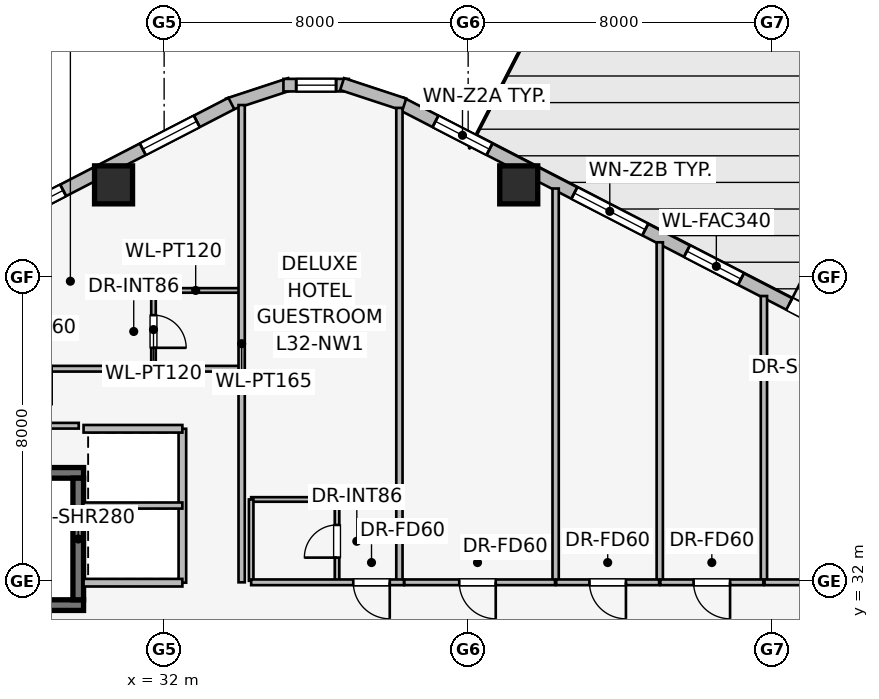
"""IFC4 building model, lengths in metres.
Left out: names, types, materials, properties, quantities, classifications, styles, units other than length and angle.
Written with IfcOpenShell. Run it as: python <this file> out.ifc"""

import sys

from ifc_helpers import new_model, si_unit, direction, frame, frame_2d, origin, origin_2d, place, context, subcontext, project, spatial, rectangle, extrude, element, fill, save


model = new_model("IFC4")
c1 = context("Model", 3, precision=1e-05, world=origin(), true_north=direction((0.0, 1.0)))
c2 = subcontext(c1, "Body", "Model", "MODEL_VIEW")
j1 = project(units=[si_unit("LENGTHUNIT", "METRE"), si_unit("PLANEANGLEUNIT", "RADIAN")], contexts=[c1])
p1 = place(None, origin())
s1 = spatial("IfcSite", under=j1, at=p1, CompositionType="ELEMENT")
p2 = place(p1, origin())
s2 = spatial("IfcBuilding", under=s1, at=p2, CompositionType="ELEMENT")
p3 = place(p2, frame((0.0, 0.0, 122.25)))
s3 = spatial("IfcBuildingStorey", under=s2, at=p3, CompositionType="ELEMENT", Elevation=122.25)
p4 = place(p3, frame((21.52, 31.36, 0.0), z_axis=(0.0, 0.0, 1.0), x_axis=(1.0, 0.0, 0.0)))
e1 = element("IfcWall", 1, at=p4, inside=s3, PredefinedType="SHEAR", context=c2, shape_type="SweptSolid", body=[
    extrude(rectangle(XDim=8.36, YDim=0.28, at=frame_2d((4.18, 0.0))), origin(), (0.0, 0.0, 1.0), 3.45),
])
p5 = place(p4, frame((0.45, 0.0, 0.0)))
e2 = element("IfcOpeningElement", 2, at=p5, cuts=e1, PredefinedType="OPENING", context=c2, shape_type="SweptSolid", body=[
    extrude(rectangle(XDim=1.05, YDim=2.0, at=frame_2d((0.525, 1.0))), frame((0.0, 0.15, 0.0), z_axis=(0.0, -1.0, 0.0), x_axis=(1.0, 0.0, 0.0)), (0.0, 0.0, 1.0), 0.3),
])
p6 = place(p3, frame((29.88, 34.84, 0.0), z_axis=(0.0, 0.0, 1.0), x_axis=(-1.0, 0.0, 0.0)))
e3 = element("IfcWall", 3, at=p6, inside=s3, PredefinedType="SHEAR", context=c2, shape_type="SweptSolid", body=[
    extrude(rectangle(XDim=8.36, YDim=0.28, at=frame_2d((4.18, 0.0))), origin(), (0.0, 0.0, 1.0), 3.45),
])
p7 = place(p3, frame((29.74, 31.5, 0.0), z_axis=(0.0, 0.0, 1.0), x_axis=(0.0, 1.0, 0.0)))
e4 = element("IfcWall", 4, at=p7, inside=s3, PredefinedType="SHEAR", context=c2, shape_type="SweptSolid", body=[
    extrude(rectangle(XDim=3.2, YDim=0.28, at=frame_2d((1.6, 0.0))), origin(), (0.0, 0.0, 1.0), 3.45),
])
for number, where, z_axis, x_axis in (
    (5, (41.331, 42.418, 0.0), (0.0, 0.0, 1.0), (1.0, 0.0, 0.0)),
    (6, (30.669, 42.418, 0.0), (0.0, 0.0, 1.0), (1.0, 0.0, 0.0)),
):
    element("IfcColumn", number, at=place(p3, frame(where, z_axis=z_axis, x_axis=x_axis)), inside=s3, PredefinedType="COLUMN", context=c2, shape_type="SweptSolid", body=[
        extrude(rectangle(XDim=1.0, YDim=1.0, at=origin_2d()), origin(), (0.0, 0.0, 1.0), 3.45),
    ])
p8 = place(p3, frame((38.231, 44.558, 0.0), z_axis=(0.0, 0.0, 1.0), x_axis=(0.888613612362, -0.458656568606, 0.0)))
e7 = element("IfcWall", 7, at=p8, inside=s3, PredefinedType="STANDARD", context=c2, shape_type="SweptSolid", body=[
    extrude(rectangle(XDim=18.681, YDim=0.34, at=frame_2d((9.34, 0.0))), origin(), (0.0, 0.0, 1.0), 3.19),
])
p9 = place(p8, frame((11.5, 0.0, 0.0)))
e8 = element("IfcOpeningElement", 8, at=p9, cuts=e7, PredefinedType="OPENING", context=c2, shape_type="SweptSolid", body=[
    extrude(rectangle(XDim=1.65, YDim=2.25, at=frame_2d((0.825, 1.125))), frame((0.0, 0.18, 0.0), z_axis=(0.0, -1.0, 0.0), x_axis=(1.0, 0.0, 0.0)), (0.0, 0.0, 1.0), 0.36),
])
p10 = place(p8, frame((1.023, 0.0, 0.75)))
e9 = element("IfcOpeningElement", 9, at=p10, cuts=e7, PredefinedType="OPENING", context=c2, shape_type="SweptSolid", body=[
    extrude(rectangle(XDim=1.6, YDim=1.55, at=frame_2d((0.8, 0.775))), frame((0.0, 0.18, 0.0), z_axis=(0.0, -1.0, 0.0), x_axis=(1.0, 0.0, 0.0)), (0.0, 0.0, 1.0), 0.36),
])
p11 = place(p8, frame((5.135, 0.0, 0.75)))
e10 = element("IfcOpeningElement", 10, at=p11, cuts=e7, PredefinedType="OPENING", context=c2, shape_type="SweptSolid", body=[
    extrude(rectangle(XDim=2.1, YDim=1.5, at=frame_2d((1.05, 0.75))), frame((0.0, 0.18, 0.0), z_axis=(0.0, -1.0, 0.0), x_axis=(1.0, 0.0, 0.0)), (0.0, 0.0, 1.0), 0.36),
])
p12 = place(p8, frame((8.469, 0.0, 0.75)))
e11 = element("IfcOpeningElement", 11, at=p12, cuts=e7, PredefinedType="OPENING", context=c2, shape_type="SweptSolid", body=[
    extrude(rectangle(XDim=1.6, YDim=1.55, at=frame_2d((0.8, 0.775))), frame((0.0, 0.18, 0.0), z_axis=(0.0, -1.0, 0.0), x_axis=(1.0, 0.0, 0.0)), (0.0, 0.0, 1.0), 0.36),
])
p13 = place(p8, frame((16.697, 0.0, 0.75)))
e12 = element("IfcOpeningElement", 12, at=p13, cuts=e7, PredefinedType="OPENING", context=c2, shape_type="SweptSolid", body=[
    extrude(rectangle(XDim=1.05, YDim=1.4, at=frame_2d((0.525, 0.7))), frame((0.0, 0.18, 0.0), z_axis=(0.0, -1.0, 0.0), x_axis=(1.0, 0.0, 0.0)), (0.0, 0.0, 1.0), 0.36),
])
p14 = place(p3, frame((33.681, 44.532, 0.0), z_axis=(0.0, 0.0, 1.0), x_axis=(0.949937416267, 0.312440242569, 0.0)))
e13 = element("IfcWall", 13, at=p14, inside=s3, PredefinedType="STANDARD", context=c2, shape_type="SweptSolid", body=[
    extrude(rectangle(XDim=1.722, YDim=0.33, at=frame_2d((0.861, 0.0))), origin(), (0.0, 0.0, 1.0), 3.19),
])
p15 = place(p3, frame((35.139, 45.041, 0.0), z_axis=(0.0, 0.0, 1.0), x_axis=(1.0, 0.0, 0.0)))
e14 = element("IfcWall", 14, at=p15, inside=s3, PredefinedType="STANDARD", context=c2, shape_type="SweptSolid", body=[
    extrude(rectangle(XDim=1.722, YDim=0.33, at=frame_2d((0.861, 0.0))), origin(), (0.0, 0.0, 1.0), 3.19),
])
p16 = place(p15, frame((0.336, 0.0, 0.75)))
e15 = element("IfcOpeningElement", 15, at=p16, cuts=e14, PredefinedType="OPENING", context=c2, shape_type="SweptSolid", body=[
    extrude(rectangle(XDim=1.05, YDim=1.4, at=frame_2d((0.525, 0.7))), frame((0.0, 0.175, 0.0), z_axis=(0.0, -1.0, 0.0), x_axis=(1.0, 0.0, 0.0)), (0.0, 0.0, 1.0), 0.35),
])
p17 = place(p3, frame((36.683, 45.07, 0.0), z_axis=(0.0, 0.0, 1.0), x_axis=(0.949937416267, -0.312440242569, 0.0)))
e16 = element("IfcWall", 16, at=p17, inside=s3, PredefinedType="STANDARD", context=c2, shape_type="SweptSolid", body=[
    extrude(rectangle(XDim=1.722, YDim=0.33, at=frame_2d((0.861, 0.0))), origin(), (0.0, 0.0, 1.0), 3.19),
])
p18 = place(p3, frame((17.169, 35.99, 0.0), z_axis=(0.0, 0.0, 1.0), x_axis=(0.888613612362, 0.458656568606, 0.0)))
e17 = element("IfcWall", 17, at=p18, inside=s3, PredefinedType="STANDARD", context=c2, shape_type="SweptSolid", body=[
    extrude(rectangle(XDim=18.681, YDim=0.34, at=frame_2d((9.34, 0.0))), origin(), (0.0, 0.0, 1.0), 3.19),
])
p19 = place(p18, frame((1.023, 0.0, 0.75)))
e18 = element("IfcOpeningElement", 18, at=p19, cuts=e17, PredefinedType="OPENING", context=c2, shape_type="SweptSolid", body=[
    extrude(rectangle(XDim=1.6, YDim=1.55, at=frame_2d((0.8, 0.775))), frame((0.0, 0.18, 0.0), z_axis=(0.0, -1.0, 0.0), x_axis=(1.0, 0.0, 0.0)), (0.0, 0.0, 1.0), 0.36),
])
p20 = place(p18, frame((4.981, 0.0, 0.75)))
e19 = element("IfcOpeningElement", 19, at=p20, cuts=e17, PredefinedType="OPENING", context=c2, shape_type="SweptSolid", body=[
    extrude(rectangle(XDim=2.1, YDim=1.5, at=frame_2d((1.05, 0.75))), frame((0.0, 0.18, 0.0), z_axis=(0.0, -1.0, 0.0), x_axis=(1.0, 0.0, 0.0)), (0.0, 0.0, 1.0), 0.36),
])
p21 = place(p18, frame((8.29, 0.0, 0.75)))
e20 = element("IfcOpeningElement", 20, at=p21, cuts=e17, PredefinedType="OPENING", context=c2, shape_type="SweptSolid", body=[
    extrude(rectangle(XDim=2.1, YDim=1.5, at=frame_2d((1.05, 0.75))), frame((0.0, 0.18, 0.0), z_axis=(0.0, -1.0, 0.0), x_axis=(1.0, 0.0, 0.0)), (0.0, 0.0, 1.0), 0.36),
])
p22 = place(p18, frame((11.6, 0.0, 0.75)))
e21 = element("IfcOpeningElement", 21, at=p22, cuts=e17, PredefinedType="OPENING", context=c2, shape_type="SweptSolid", body=[
    extrude(rectangle(XDim=2.1, YDim=1.5, at=frame_2d((1.05, 0.75))), frame((0.0, 0.18, 0.0), z_axis=(0.0, -1.0, 0.0), x_axis=(1.0, 0.0, 0.0)), (0.0, 0.0, 1.0), 0.36),
])
p23 = place(p18, frame((16.058, 0.0, 0.75)))
e22 = element("IfcOpeningElement", 22, at=p23, cuts=e17, PredefinedType="OPENING", context=c2, shape_type="SweptSolid", body=[
    extrude(rectangle(XDim=1.6, YDim=1.55, at=frame_2d((0.8, 0.775))), frame((0.0, 0.18, 0.0), z_axis=(0.0, -1.0, 0.0), x_axis=(1.0, 0.0, 0.0)), (0.0, 0.0, 1.0), 0.36),
])
p24 = place(p3, frame((32.48, 31.95, 0.0), z_axis=(0.0, 0.0, 1.0), x_axis=(0.0, 1.0, 0.0)))
e23 = element("IfcWall", 23, at=p24, inside=s3, PredefinedType="PARTITIONING", context=c2, shape_type="SweptSolid", body=[
    extrude(rectangle(XDim=4.05, YDim=0.2, at=frame_2d((2.025, 0.0))), origin(), (0.0, 0.0, 1.0), 3.19),
])
for number, where, z_axis, x_axis in (
    (24, (29.88, 36.0, 0.0), (0.0, 0.0, 1.0), (1.0, 0.0, 0.0)),
    (25, (32.48, 31.95, 0.0), (0.0, 0.0, 1.0), (-1.0, 0.0, 0.0)),
):
    element("IfcWall", number, at=place(p3, frame(where, z_axis=z_axis, x_axis=x_axis)), inside=s3, PredefinedType="PARTITIONING", context=c2, shape_type="SweptSolid", body=[
        extrude(rectangle(XDim=2.6, YDim=0.2, at=frame_2d((1.3, 0.0))), origin(), (0.0, 0.0, 1.0), 3.19),
    ])
p25 = place(p3, frame((29.875, 33.98, 0.0), z_axis=(0.0, 0.0, 1.0), x_axis=(1.0, 0.0, 0.0)))
e26 = element("IfcWall", 26, at=p25, inside=s3, PredefinedType="PARTITIONING", context=c2, shape_type="SweptSolid", body=[
    extrude(rectangle(XDim=2.605, YDim=0.16, at=frame_2d((1.302, 0.0))), origin(), (0.0, 0.0, 1.0), 3.19),
])
p26 = place(p3, frame((34.0, 39.64, 0.0), z_axis=(0.0, 0.0, 1.0), x_axis=(-1.0, 0.0, 0.0)))
e27 = element("IfcWall", 27, at=p26, inside=s3, PredefinedType="PARTITIONING", context=c2, shape_type="SweptSolid", body=[
    extrude(rectangle(XDim=2.34, YDim=0.12, at=frame_2d((1.17, 0.0))), origin(), (0.0, 0.0, 1.0), 3.19),
])
p27 = place(p3, frame((31.72, 39.64, 0.0), z_axis=(0.0, 0.0, 1.0), x_axis=(0.0, -1.0, 0.0)))
e28 = element("IfcWall", 28, at=p27, inside=s3, PredefinedType="PARTITIONING", context=c2, shape_type="SweptSolid", body=[
    extrude(rectangle(XDim=2.06, YDim=0.12, at=frame_2d((1.03, 0.0))), origin(), (0.0, 0.0, 1.0), 3.19),
])
p28 = place(p27, frame((0.65, 0.0, 0.0)))
e29 = element("IfcOpeningElement", 29, at=p28, cuts=e28, PredefinedType="OPENING", context=c2, shape_type="SweptSolid", body=[
    extrude(rectangle(XDim=0.86, YDim=2.0, at=frame_2d((0.43, 1.0))), frame((0.0, 0.07, 0.0), z_axis=(0.0, -1.0, 0.0), x_axis=(1.0, 0.0, 0.0)), (0.0, 0.0, 1.0), 0.14),
])
p29 = place(p3, frame((34.0, 37.58, 0.0), z_axis=(0.0, 0.0, 1.0), x_axis=(-1.0, 0.0, 0.0)))
e30 = element("IfcWall", 30, at=p29, inside=s3, PredefinedType="PARTITIONING", context=c2, shape_type="SweptSolid", body=[
    extrude(rectangle(XDim=13.707, YDim=0.15, at=frame_2d((6.854, 0.0))), origin(), (0.0, 0.0, 1.0), 3.19),
])
p30 = place(p29, frame((4.96, 0.0, 0.0)))
e31 = element("IfcOpeningElement", 31, at=p30, cuts=e30, PredefinedType="OPENING", context=c2, shape_type="SweptSolid", body=[
    extrude(rectangle(XDim=0.96, YDim=2.0, at=frame_2d((0.48, 1.0))), frame((0.0, 0.085, 0.0), z_axis=(0.0, -1.0, 0.0), x_axis=(1.0, 0.0, 0.0)), (0.0, 0.0, 1.0), 0.17),
])
p31 = place(p3, frame((34.04, 31.96, 0.0), z_axis=(0.0, 0.0, 1.0), x_axis=(0.0, 1.0, 0.0)))
e32 = element("IfcWall", 32, at=p31, inside=s3, PredefinedType="PARTITIONING", context=c2, shape_type="SweptSolid", body=[
    extrude(rectangle(XDim=12.558, YDim=0.165, at=frame_2d((6.279, 0.0))), origin(), (0.0, 0.0, 1.0), 3.19),
])
p32 = place(p3, frame((38.191, 31.97, 0.0), z_axis=(0.0, 0.0, 1.0), x_axis=(0.0, 1.0, 0.0)))
e33 = element("IfcWall", 33, at=p32, inside=s3, PredefinedType="PARTITIONING", context=c2, shape_type="SweptSolid", body=[
    extrude(rectangle(XDim=12.473, YDim=0.165, at=frame_2d((6.237, 0.0))), origin(), (0.0, 0.0, 1.0), 3.19),
])
p33 = place(p3, frame((42.302, 31.97, 0.0), z_axis=(0.0, 0.0, 1.0), x_axis=(0.0, 1.0, 0.0)))
e34 = element("IfcWall", 34, at=p33, inside=s3, PredefinedType="PARTITIONING", context=c2, shape_type="SweptSolid", body=[
    extrude(rectangle(XDim=10.352, YDim=0.165, at=frame_2d((5.176, 0.0))), origin(), (0.0, 0.0, 1.0), 3.19),
])
p34 = place(p3, frame((45.042, 31.97, 0.0), z_axis=(0.0, 0.0, 1.0), x_axis=(0.0, 1.0, 0.0)))
e35 = element("IfcWall", 35, at=p34, inside=s3, PredefinedType="PARTITIONING", context=c2, shape_type="SweptSolid", body=[
    extrude(rectangle(XDim=8.937, YDim=0.165, at=frame_2d((4.469, 0.0))), origin(), (0.0, 0.0, 1.0), 3.19),
])
p35 = place(p3, frame((47.783, 31.97, 0.0), z_axis=(0.0, 0.0, 1.0), x_axis=(0.0, 1.0, 0.0)))
e36 = element("IfcWall", 36, at=p35, inside=s3, PredefinedType="PARTITIONING", context=c2, shape_type="SweptSolid", body=[
    extrude(rectangle(XDim=7.523, YDim=0.165, at=frame_2d((3.761, 0.0))), origin(), (0.0, 0.0, 1.0), 3.19),
])
p36 = place(p3, frame((36.55, 31.96, 0.0), z_axis=(0.0, 0.0, 1.0), x_axis=(0.0, 1.0, 0.0)))
e37 = element("IfcWall", 37, at=p36, inside=s3, PredefinedType="PARTITIONING", context=c2, shape_type="SweptSolid", body=[
    extrude(rectangle(XDim=2.24, YDim=0.12, at=frame_2d((1.12, 0.0))), origin(), (0.0, 0.0, 1.0), 3.19),
])
p37 = place(p36, frame((0.65, 0.0, 0.0)))
e38 = element("IfcOpeningElement", 38, at=p37, cuts=e37, PredefinedType="OPENING", context=c2, shape_type="SweptSolid", body=[
    extrude(rectangle(XDim=0.86, YDim=2.0, at=frame_2d((0.43, 1.0))), frame((0.0, 0.07, 0.0), z_axis=(0.0, -1.0, 0.0), x_axis=(1.0, 0.0, 0.0)), (0.0, 0.0, 1.0), 0.14),
])
p38 = place(p3, frame((36.61, 34.14, 0.0), z_axis=(0.0, 0.0, 1.0), x_axis=(-1.0, 0.0, 0.0)))
e39 = element("IfcWall", 39, at=p38, inside=s3, PredefinedType="PARTITIONING", context=c2, shape_type="SweptSolid", body=[
    extrude(rectangle(XDim=2.32, YDim=0.12, at=frame_2d((1.16, 0.0))), origin(), (0.0, 0.0, 1.0), 3.19),
])
p39 = place(p3, frame((34.29, 34.14, 0.0), z_axis=(0.0, 0.0, 1.0), x_axis=(0.0, -1.0, 0.0)))
e40 = element("IfcWall", 40, at=p39, inside=s3, PredefinedType="PARTITIONING", context=c2, shape_type="SweptSolid", body=[
    extrude(rectangle(XDim=2.14, YDim=0.12, at=frame_2d((1.07, 0.0))), origin(), (0.0, 0.0, 1.0), 3.19),
])
p40 = place(p3, frame((38.311, 31.96, 0.0), z_axis=(0.0, 0.0, 1.0), x_axis=(-1.0, 0.0, 0.0)))
e41 = element("IfcWall", 41, at=p40, inside=s3, PredefinedType="PARTITIONING", context=c2, shape_type="SweptSolid", body=[
    extrude(rectangle(XDim=4.021, YDim=0.15, at=frame_2d((2.01, 0.0))), origin(), (0.0, 0.0, 1.0), 3.19),
])
p41 = place(p40, frame((0.374, 0.0, 0.0)))
e42 = element("IfcOpeningElement", 42, at=p41, cuts=e41, PredefinedType="OPENING", context=c2, shape_type="SweptSolid", body=[
    extrude(rectangle(XDim=0.96, YDim=2.0, at=frame_2d((0.48, 1.0))), frame((0.0, 0.085, 0.0), z_axis=(0.0, -1.0, 0.0), x_axis=(1.0, 0.0, 0.0)), (0.0, 0.0, 1.0), 0.17),
])
p42 = place(p3, frame((42.286, 31.96, 0.0), z_axis=(0.0, 0.0, 1.0), x_axis=(-1.0, 0.0, 0.0)))
e43 = element("IfcWall", 43, at=p42, inside=s3, PredefinedType="PARTITIONING", context=c2, shape_type="SweptSolid", body=[
    extrude(rectangle(XDim=3.965, YDim=0.15, at=frame_2d((1.982, 0.0))), origin(), (0.0, 0.0, 1.0), 3.19),
])
p43 = place(p42, frame((1.56, 0.0, 0.0)))
e44 = element("IfcOpeningElement", 44, at=p43, cuts=e43, PredefinedType="OPENING", context=c2, shape_type="SweptSolid", body=[
    extrude(rectangle(XDim=0.96, YDim=2.0, at=frame_2d((0.48, 1.0))), frame((0.0, 0.085, 0.0), z_axis=(0.0, -1.0, 0.0), x_axis=(1.0, 0.0, 0.0)), (0.0, 0.0, 1.0), 0.17),
])
p44 = place(p3, frame((45.026, 31.96, 0.0), z_axis=(0.0, 0.0, 1.0), x_axis=(-1.0, 0.0, 0.0)))
e45 = element("IfcWall", 45, at=p44, inside=s3, PredefinedType="PARTITIONING", context=c2, shape_type="SweptSolid", body=[
    extrude(rectangle(XDim=2.708, YDim=0.15, at=frame_2d((1.354, 0.0))), origin(), (0.0, 0.0, 1.0), 3.19),
])
p45 = place(p44, frame((0.874, 0.0, 0.0)))
e46 = element("IfcOpeningElement", 46, at=p45, cuts=e45, PredefinedType="OPENING", context=c2, shape_type="SweptSolid", body=[
    extrude(rectangle(XDim=0.96, YDim=2.0, at=frame_2d((0.48, 1.0))), frame((0.0, 0.085, 0.0), z_axis=(0.0, -1.0, 0.0), x_axis=(1.0, 0.0, 0.0)), (0.0, 0.0, 1.0), 0.17),
])
p46 = place(p3, frame((47.767, 31.96, 0.0), z_axis=(0.0, 0.0, 1.0), x_axis=(-1.0, 0.0, 0.0)))
e47 = element("IfcWall", 47, at=p46, inside=s3, PredefinedType="PARTITIONING", context=c2, shape_type="SweptSolid", body=[
    extrude(rectangle(XDim=2.709, YDim=0.15, at=frame_2d((1.354, 0.0))), origin(), (0.0, 0.0, 1.0), 3.19),
])
p47 = place(p46, frame((0.875, 0.0, 0.0)))
e48 = element("IfcOpeningElement", 48, at=p47, cuts=e47, PredefinedType="OPENING", context=c2, shape_type="SweptSolid", body=[
    extrude(rectangle(XDim=0.96, YDim=2.0, at=frame_2d((0.48, 1.0))), frame((0.0, 0.085, 0.0), z_axis=(0.0, -1.0, 0.0), x_axis=(1.0, 0.0, 0.0)), (0.0, 0.0, 1.0), 0.17),
])
p48 = place(p3, frame((52.22, 31.96, 0.0), z_axis=(0.0, 0.0, 1.0), x_axis=(-1.0, 0.0, 0.0)))
e49 = element("IfcWall", 49, at=p48, inside=s3, PredefinedType="PARTITIONING", context=c2, shape_type="SweptSolid", body=[
    extrude(rectangle(XDim=4.421, YDim=0.15, at=frame_2d((2.21, 0.0))), origin(), (0.0, 0.0, 1.0), 3.19),
])
p49 = place(p48, frame((1.674, 0.0, 0.0)))
e50 = element("IfcOpeningElement", 50, at=p49, cuts=e49, PredefinedType="OPENING", context=c2, shape_type="SweptSolid", body=[
    extrude(rectangle(XDim=0.96, YDim=2.0, at=frame_2d((0.48, 1.0))), frame((0.0, 0.085, 0.0), z_axis=(0.0, -1.0, 0.0), x_axis=(1.0, 0.0, 0.0)), (0.0, 0.0, 1.0), 0.17),
])
p50 = place(p3, frame((29.753, 36.08, 0.0), z_axis=(0.0, 0.0, 1.0), x_axis=(-1.0, 0.0, 0.0)))
e51 = element("IfcWall", 51, at=p50, inside=s3, PredefinedType="PARTITIONING", context=c2, shape_type="SweptSolid", body=[
    extrude(rectangle(XDim=7.353, YDim=0.15, at=frame_2d((3.677, 0.0))), origin(), (0.0, 0.0, 1.0), 3.19),
])
p51 = place(p9, origin())
e52 = element("IfcDoor", 52, at=p51, inside=s3, OperationType="SINGLE_SWING_LEFT", PredefinedType="DOOR", context=c2, shape_type="SweptSolid", body=[
    extrude(rectangle(XDim=1.65, YDim=2.25, at=frame_2d((0.825, 1.125))), frame((0.0, 0.025, 0.0), z_axis=(0.0, -1.0, 0.0), x_axis=(1.0, 0.0, 0.0)), (0.0, 0.0, 1.0), 0.05),
])
fill(e8, e52)
p52 = place(p10, origin())
e53 = element("IfcWindow", 53, at=p52, inside=s3, PartitioningType="SINGLE_PANEL", PredefinedType="WINDOW", context=c2, shape_type="SweptSolid", body=[
    extrude(rectangle(XDim=1.6, YDim=1.55, at=frame_2d((0.8, 0.775))), frame((0.0, 0.03, 0.0), z_axis=(0.0, -1.0, 0.0), x_axis=(1.0, 0.0, 0.0)), (0.0, 0.0, 1.0), 0.06),
])
fill(e9, e53)
p53 = place(p11, origin())
e54 = element("IfcWindow", 54, at=p53, inside=s3, PartitioningType="SINGLE_PANEL", PredefinedType="WINDOW", context=c2, shape_type="SweptSolid", body=[
    extrude(rectangle(XDim=2.1, YDim=1.5, at=frame_2d((1.05, 0.75))), frame((0.0, 0.03, 0.0), z_axis=(0.0, -1.0, 0.0), x_axis=(1.0, 0.0, 0.0)), (0.0, 0.0, 1.0), 0.06),
])
fill(e10, e54)
p54 = place(p12, origin())
e55 = element("IfcWindow", 55, at=p54, inside=s3, PartitioningType="SINGLE_PANEL", PredefinedType="WINDOW", context=c2, shape_type="SweptSolid", body=[
    extrude(rectangle(XDim=1.6, YDim=1.55, at=frame_2d((0.8, 0.775))), frame((0.0, 0.03, 0.0), z_axis=(0.0, -1.0, 0.0), x_axis=(1.0, 0.0, 0.0)), (0.0, 0.0, 1.0), 0.06),
])
fill(e11, e55)
p55 = place(p16, origin())
e56 = element("IfcWindow", 56, at=p55, inside=s3, PartitioningType="SINGLE_PANEL", PredefinedType="WINDOW", context=c2, shape_type="SweptSolid", body=[
    extrude(rectangle(XDim=1.05, YDim=1.4, at=frame_2d((0.525, 0.7))), frame((0.0, 0.03, 0.0), z_axis=(0.0, -1.0, 0.0), x_axis=(1.0, 0.0, 0.0)), (0.0, 0.0, 1.0), 0.06),
])
fill(e15, e56)
p56 = place(p22, origin())
e57 = element("IfcWindow", 57, at=p56, inside=s3, PartitioningType="SINGLE_PANEL", PredefinedType="WINDOW", context=c2, shape_type="SweptSolid", body=[
    extrude(rectangle(XDim=2.1, YDim=1.5, at=frame_2d((1.05, 0.75))), frame((0.0, 0.03, 0.0), z_axis=(0.0, -1.0, 0.0), x_axis=(1.0, 0.0, 0.0)), (0.0, 0.0, 1.0), 0.06),
])
fill(e21, e57)
p57 = place(p23, origin())
e58 = element("IfcWindow", 58, at=p57, inside=s3, PartitioningType="SINGLE_PANEL", PredefinedType="WINDOW", context=c2, shape_type="SweptSolid", body=[
    extrude(rectangle(XDim=1.6, YDim=1.55, at=frame_2d((0.8, 0.775))), frame((0.0, 0.03, 0.0), z_axis=(0.0, -1.0, 0.0), x_axis=(1.0, 0.0, 0.0)), (0.0, 0.0, 1.0), 0.06),
])
fill(e22, e58)
p58 = place(p28, origin())
e59 = element("IfcDoor", 59, at=p58, inside=s3, OperationType="SINGLE_SWING_RIGHT", PredefinedType="DOOR", context=c2, shape_type="SweptSolid", body=[
    extrude(rectangle(XDim=0.86, YDim=2.0, at=frame_2d((0.43, 1.0))), frame((0.0, 0.025, 0.0), z_axis=(0.0, -1.0, 0.0), x_axis=(1.0, 0.0, 0.0)), (0.0, 0.0, 1.0), 0.05),
])
fill(e29, e59)
p59 = place(p37, origin())
e60 = element("IfcDoor", 60, at=p59, inside=s3, OperationType="SINGLE_SWING_LEFT", PredefinedType="DOOR", context=c2, shape_type="SweptSolid", body=[
    extrude(rectangle(XDim=0.86, YDim=2.0, at=frame_2d((0.43, 1.0))), frame((0.0, 0.025, 0.0), z_axis=(0.0, -1.0, 0.0), x_axis=(1.0, 0.0, 0.0)), (0.0, 0.0, 1.0), 0.05),
])
fill(e38, e60)
p60 = place(p41, origin())
e61 = element("IfcDoor", 61, at=p60, inside=s3, OperationType="SINGLE_SWING_LEFT", PredefinedType="DOOR", context=c2, shape_type="SweptSolid", body=[
    extrude(rectangle(XDim=0.96, YDim=2.0, at=frame_2d((0.48, 1.0))), frame((0.0, 0.025, 0.0), z_axis=(0.0, -1.0, 0.0), x_axis=(1.0, 0.0, 0.0)), (0.0, 0.0, 1.0), 0.05),
])
fill(e42, e61)
p61 = place(p43, origin())
e62 = element("IfcDoor", 62, at=p61, inside=s3, OperationType="SINGLE_SWING_LEFT", PredefinedType="DOOR", context=c2, shape_type="SweptSolid", body=[
    extrude(rectangle(XDim=0.96, YDim=2.0, at=frame_2d((0.48, 1.0))), frame((0.0, 0.025, 0.0), z_axis=(0.0, -1.0, 0.0), x_axis=(1.0, 0.0, 0.0)), (0.0, 0.0, 1.0), 0.05),
])
fill(e44, e62)
p62 = place(p45, origin())
e63 = element("IfcDoor", 63, at=p62, inside=s3, OperationType="SINGLE_SWING_LEFT", PredefinedType="DOOR", context=c2, shape_type="SweptSolid", body=[
    extrude(rectangle(XDim=0.96, YDim=2.0, at=frame_2d((0.48, 1.0))), frame((0.0, 0.025, 0.0), z_axis=(0.0, -1.0, 0.0), x_axis=(1.0, 0.0, 0.0)), (0.0, 0.0, 1.0), 0.05),
])
fill(e46, e63)
p63 = place(p47, origin())
e64 = element("IfcDoor", 64, at=p63, inside=s3, OperationType="SINGLE_SWING_LEFT", PredefinedType="DOOR", context=c2, shape_type="SweptSolid", body=[
    extrude(rectangle(XDim=0.96, YDim=2.0, at=frame_2d((0.48, 1.0))), frame((0.0, 0.025, 0.0), z_axis=(0.0, -1.0, 0.0), x_axis=(1.0, 0.0, 0.0)), (0.0, 0.0, 1.0), 0.05),
])
fill(e48, e64)
save(model, sys.argv[1])
